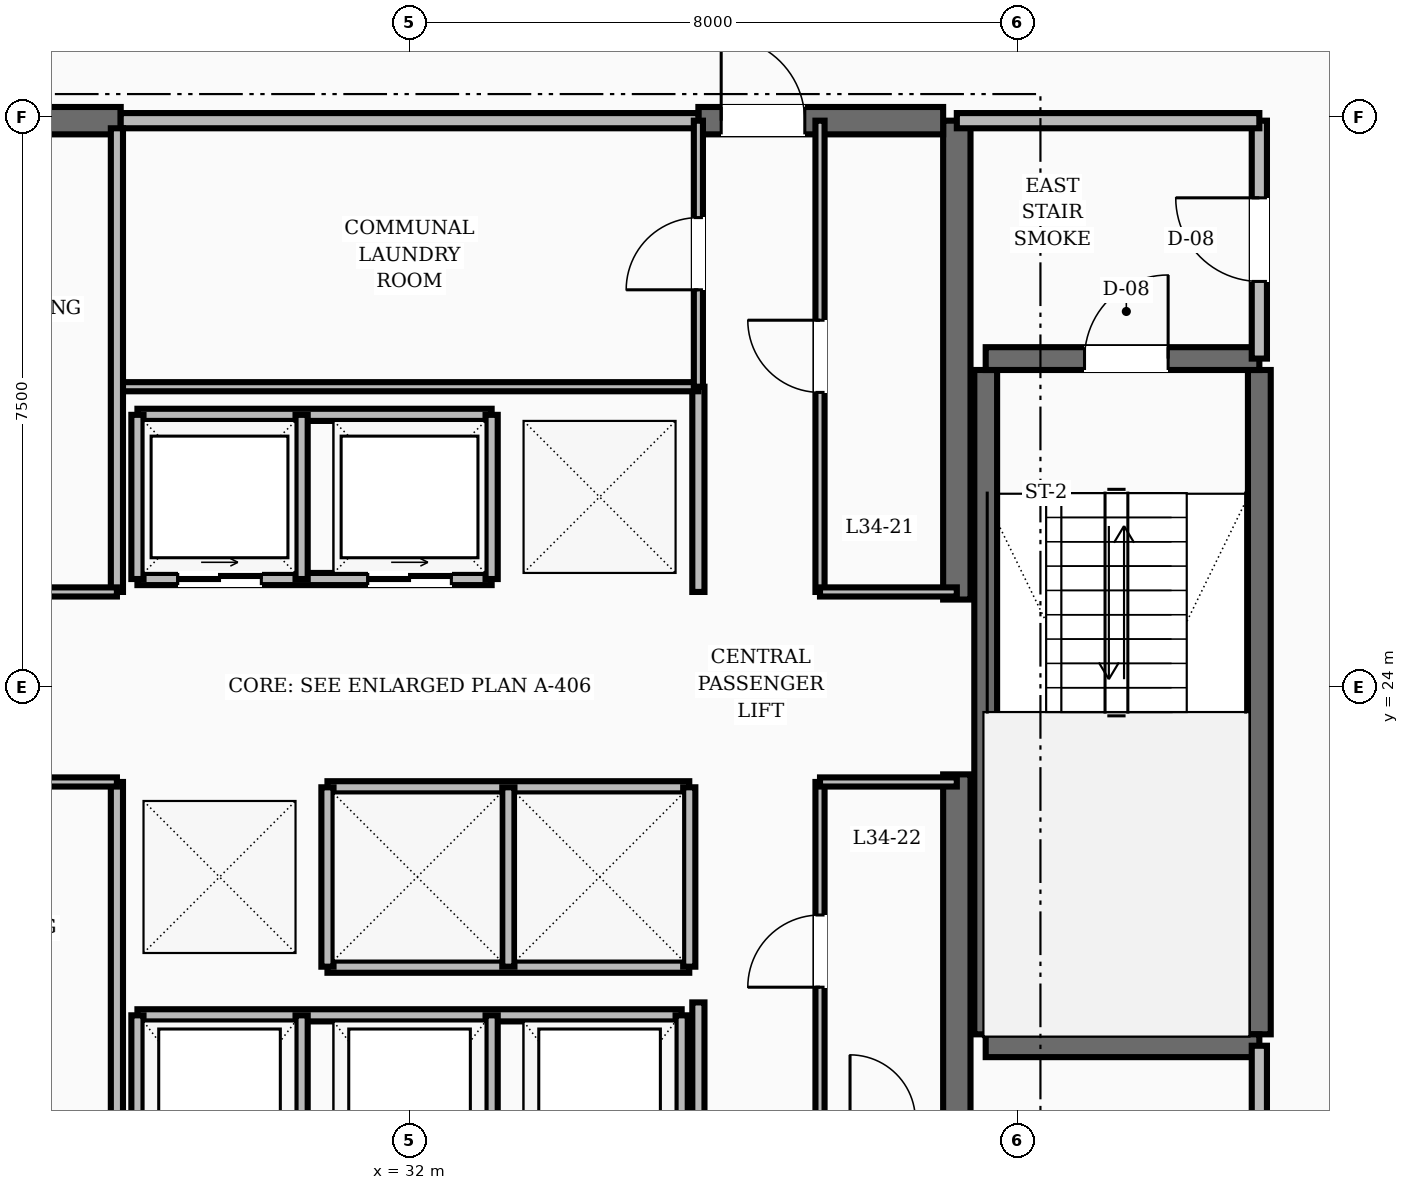
"""IFC4 building model, lengths in metres.
Left out: names, types, materials, properties, quantities, classifications, styles, units other than length and angle.
Written with IfcOpenShell. Run it as: python <this file> out.ifc"""

import sys

from ifc_helpers import new_model, si_unit, direction, frame, frame_2d, origin, place, context, subcontext, project, spatial, rectangle, extrude, element, fill, save


model = new_model("IFC4")
c1 = context("Model", 3, precision=1e-05, world=origin(), true_north=direction((0.0, 1.0)))
c2 = subcontext(c1, "Body", "Model", "MODEL_VIEW")
j1 = project(units=[si_unit("LENGTHUNIT", "METRE"), si_unit("PLANEANGLEUNIT", "RADIAN")], contexts=[c1])
p1 = place(None, origin())
s1 = spatial("IfcSite", under=j1, at=p1, CompositionType="ELEMENT")
p2 = place(p1, origin())
s2 = spatial("IfcBuilding", under=s1, at=p2, CompositionType="ELEMENT")
p3 = place(p2, frame((0.0, 0.0, 135.2)))
s3 = spatial("IfcBuildingStorey", under=s2, at=p3, CompositionType="ELEMENT", Elevation=135.2)
for number, where, z_axis, x_axis in (
    (1, (39.2, 16.55, 0.0), (0.0, 0.0, 1.0), (0.0, 1.0, 0.0)),
    (2, (39.2, 25.15, 0.0), (0.0, 0.0, 1.0), (0.0, 1.0, 0.0)),
):
    element("IfcWall", number, at=place(p3, frame(where, z_axis=z_axis, x_axis=x_axis)), inside=s3, PredefinedType="SHEAR", context=c2, shape_type="SweptSolid", body=[
        extrude(rectangle(XDim=6.3, YDim=0.36, at=frame_2d((3.15, 0.0))), origin(), (0.0, 0.0, 1.0), 3.6),
    ])
p4 = place(p3, frame((24.98, 31.45, 0.0), z_axis=(0.0, 0.0, 1.0), x_axis=(1.0, 0.0, 0.0)))
e3 = element("IfcWall", 3, at=p4, inside=s3, PredefinedType="SHEAR", context=c2, shape_type="SweptSolid", body=[
    extrude(rectangle(XDim=3.22, YDim=0.36, at=frame_2d((1.61, 0.0))), origin(), (0.0, 0.0, 1.0), 3.6),
])
p5 = place(p3, frame((35.8, 31.45, 0.0), z_axis=(0.0, 0.0, 1.0), x_axis=(1.0, 0.0, 0.0)))
e4 = element("IfcWall", 4, at=p5, inside=s3, PredefinedType="SHEAR", context=c2, shape_type="SweptSolid", body=[
    extrude(rectangle(XDim=3.22, YDim=0.36, at=frame_2d((1.61, 0.0))), origin(), (0.0, 0.0, 1.0), 3.6),
])
p6 = place(p5, frame((0.3, 0.0, 0.0)))
e5 = element("IfcOpeningElement", 5, at=p6, cuts=e4, PredefinedType="OPENING", context=c2, shape_type="SweptSolid", body=[
    extrude(rectangle(XDim=1.1, YDim=2.1, at=frame_2d((0.55, 1.05))), frame((0.0, 0.19, 0.0), z_axis=(0.0, -1.0, 0.0), x_axis=(1.0, 0.0, 0.0)), (0.0, 0.0, 1.0), 0.38),
])
for number, where, z_axis, x_axis in (
    (6, (43.18, 19.43, 0.0), (0.0, 0.0, 1.0), (0.0, 1.0, 0.0)),
    (7, (39.58, 19.43, 0.0), (0.0, 0.0, 1.0), (0.0, 1.0, 0.0)),
):
    element("IfcWall", number, at=place(p3, frame(where, z_axis=z_axis, x_axis=x_axis)), inside=s3, PredefinedType="SHEAR", context=c2, shape_type="SweptSolid", body=[
        extrude(rectangle(XDim=8.74, YDim=0.3, at=frame_2d((4.37, 0.0))), origin(), (0.0, 0.0, 1.0), 3.6),
    ])
p7 = place(p3, frame((39.58, 19.28, 0.0), z_axis=(0.0, 0.0, 1.0), x_axis=(1.0, 0.0, 0.0)))
e8 = element("IfcWall", 8, at=p7, inside=s3, PredefinedType="SHEAR", context=c2, shape_type="SweptSolid", body=[
    extrude(rectangle(XDim=3.6, YDim=0.3, at=frame_2d((1.8, 0.0))), origin(), (0.0, 0.0, 1.0), 3.6),
])
p8 = place(p3, frame((39.58, 28.32, 0.0), z_axis=(0.0, 0.0, 1.0), x_axis=(1.0, 0.0, 0.0)))
e9 = element("IfcWall", 9, at=p8, inside=s3, PredefinedType="SHEAR", context=c2, shape_type="SweptSolid", body=[
    extrude(rectangle(XDim=3.6, YDim=0.3, at=frame_2d((1.8, 0.0))), origin(), (0.0, 0.0, 1.0), 3.6),
])
p9 = place(p8, frame((1.3, 0.0, 0.0)))
e10 = element("IfcOpeningElement", 10, at=p9, cuts=e9, PredefinedType="OPENING", context=c2, shape_type="SweptSolid", body=[
    extrude(rectangle(XDim=1.1, YDim=2.1, at=frame_2d((0.55, 1.05))), frame((0.0, 0.16, 0.0), z_axis=(0.0, -1.0, 0.0), x_axis=(1.0, 0.0, 0.0)), (0.0, 0.0, 1.0), 0.32),
])
p10 = place(p3, frame((43.18, 28.32, 0.0), z_axis=(0.0, 0.0, 1.0), x_axis=(0.0, 1.0, 0.0)))
e11 = element("IfcWall", 11, at=p10, inside=s3, PredefinedType="SOLIDWALL", context=c2, shape_type="SweptSolid", body=[
    extrude(rectangle(XDim=3.13, YDim=0.2, at=frame_2d((1.565, 0.0))), origin(), (0.0, 0.0, 1.0), 2.8),
])
p11 = place(p10, frame((1.015, 0.0, 0.0)))
e12 = element("IfcOpeningElement", 12, at=p11, cuts=e11, PredefinedType="OPENING", context=c2, shape_type="SweptSolid", body=[
    extrude(rectangle(XDim=1.1, YDim=2.1, at=frame_2d((0.55, 1.05))), frame((0.0, 0.11, 0.0), z_axis=(0.0, -1.0, 0.0), x_axis=(1.0, 0.0, 0.0)), (0.0, 0.0, 1.0), 0.22),
])
p12 = place(p3, frame((39.2, 31.45, 0.0), z_axis=(0.0, 0.0, 1.0), x_axis=(1.0, 0.0, 0.0)))
e13 = element("IfcWall", 13, at=p12, inside=s3, PredefinedType="SOLIDWALL", context=c2, shape_type="SweptSolid", body=[
    extrude(rectangle(XDim=3.98, YDim=0.2, at=frame_2d((1.99, 0.0))), origin(), (0.0, 0.0, 1.0), 2.8),
])
p13 = place(p3, frame((43.18, 16.55, 0.0), z_axis=(0.0, 0.0, 1.0), x_axis=(0.0, 1.0, 0.0)))
e14 = element("IfcWall", 14, at=p13, inside=s3, PredefinedType="SOLIDWALL", context=c2, shape_type="SweptSolid", body=[
    extrude(rectangle(XDim=2.73, YDim=0.2, at=frame_2d((1.365, 0.0))), origin(), (0.0, 0.0, 1.0), 2.8),
])
p14 = place(p13, frame((0.89, 0.0, 0.0)))
e15 = element("IfcOpeningElement", 15, at=p14, cuts=e14, PredefinedType="OPENING", context=c2, shape_type="SweptSolid", body=[
    extrude(rectangle(XDim=0.95, YDim=2.1, at=frame_2d((0.475, 1.05))), frame((0.0, 0.11, 0.0), z_axis=(0.0, -1.0, 0.0), x_axis=(1.0, 0.0, 0.0)), (0.0, 0.0, 1.0), 0.22),
])
p15 = place(p3, frame((35.8, 16.55, 0.0), z_axis=(0.0, 0.0, 1.0), x_axis=(0.0, 1.0, 0.0)))
e16 = element("IfcWall", 16, at=p15, inside=s3, PredefinedType="SOLIDWALL", context=c2, shape_type="SweptSolid", body=[
    extrude(rectangle(XDim=3.3, YDim=0.16, at=frame_2d((1.65, 0.0))), origin(), (0.0, 0.0, 1.0), 2.8),
])
p16 = place(p3, frame((35.8, 25.25, 0.0), z_axis=(0.0, 0.0, 1.0), x_axis=(0.0, 1.0, 0.0)))
e17 = element("IfcWall", 17, at=p16, inside=s3, PredefinedType="SOLIDWALL", context=c2, shape_type="SweptSolid", body=[
    extrude(rectangle(XDim=2.7, YDim=0.16, at=frame_2d((1.35, 0.0))), origin(), (0.0, 0.0, 1.0), 2.8),
])
p17 = place(p3, frame((28.42, 25.42, 0.0), z_axis=(0.0, 0.0, 1.0), x_axis=(1.0, 0.0, 0.0)))
e18 = element("IfcWall", 18, at=p17, inside=s3, PredefinedType="SOLIDWALL", context=c2, shape_type="SweptSolid", body=[
    extrude(rectangle(XDim=4.66, YDim=0.16, at=frame_2d((2.33, 0.0))), origin(), (0.0, 0.0, 1.0), 2.8),
])
p18 = place(p17, frame((0.53, 0.0, 0.0)))
e19 = element("IfcOpeningElement", 19, at=p18, cuts=e18, PredefinedType="OPENING", context=c2, shape_type="SweptSolid", body=[
    extrude(rectangle(XDim=1.1, YDim=2.15, at=frame_2d((0.55, 1.075))), frame((0.0, 0.09, 0.0), z_axis=(0.0, -1.0, 0.0), x_axis=(1.0, 0.0, 0.0)), (0.0, 0.0, 1.0), 0.18),
])
p19 = place(p17, frame((3.03, 0.0, 0.0)))
e20 = element("IfcOpeningElement", 20, at=p19, cuts=e18, PredefinedType="OPENING", context=c2, shape_type="SweptSolid", body=[
    extrude(rectangle(XDim=1.1, YDim=2.15, at=frame_2d((0.55, 1.075))), frame((0.0, 0.09, 0.0), z_axis=(0.0, -1.0, 0.0), x_axis=(1.0, 0.0, 0.0)), (0.0, 0.0, 1.0), 0.18),
])
p20 = place(p3, frame((28.42, 27.58, 0.0), z_axis=(0.0, 0.0, 1.0), x_axis=(1.0, 0.0, 0.0)))
e21 = element("IfcWall", 21, at=p20, inside=s3, PredefinedType="SOLIDWALL", context=c2, shape_type="SweptSolid", body=[
    extrude(rectangle(XDim=4.66, YDim=0.16, at=frame_2d((2.33, 0.0))), origin(), (0.0, 0.0, 1.0), 2.8),
])
for number, where, z_axis, x_axis in (
    (22, (28.42, 25.42, 0.0), (0.0, 0.0, 1.0), (0.0, 1.0, 0.0)),
    (23, (30.58, 25.42, 0.0), (0.0, 0.0, 1.0), (0.0, 1.0, 0.0)),
    (24, (33.08, 25.42, 0.0), (0.0, 0.0, 1.0), (0.0, 1.0, 0.0)),
):
    element("IfcWall", number, at=place(p3, frame(where, z_axis=z_axis, x_axis=x_axis)), inside=s3, PredefinedType="SOLIDWALL", context=c2, shape_type="SweptSolid", body=[
        extrude(rectangle(XDim=2.16, YDim=0.16, at=frame_2d((1.08, 0.0))), origin(), (0.0, 0.0, 1.0), 2.8),
    ])
for number, where, z_axis, x_axis in (
    (25, (30.92, 22.68, 0.0), (0.0, 0.0, 1.0), (1.0, 0.0, 0.0)),
    (26, (30.92, 20.32, 0.0), (0.0, 0.0, 1.0), (1.0, 0.0, 0.0)),
):
    element("IfcWall", number, at=place(p3, frame(where, z_axis=z_axis, x_axis=x_axis)), inside=s3, PredefinedType="SOLIDWALL", context=c2, shape_type="SweptSolid", body=[
        extrude(rectangle(XDim=4.76, YDim=0.16, at=frame_2d((2.38, 0.0))), origin(), (0.0, 0.0, 1.0), 2.8),
    ])
for number, where, z_axis, x_axis in (
    (27, (30.92, 20.32, 0.0), (0.0, 0.0, 1.0), (0.0, 1.0, 0.0)),
    (28, (33.3, 20.32, 0.0), (0.0, 0.0, 1.0), (0.0, 1.0, 0.0)),
    (29, (35.68, 20.32, 0.0), (0.0, 0.0, 1.0), (0.0, 1.0, 0.0)),
):
    element("IfcWall", number, at=place(p3, frame(where, z_axis=z_axis, x_axis=x_axis)), inside=s3, PredefinedType="SOLIDWALL", context=c2, shape_type="SweptSolid", body=[
        extrude(rectangle(XDim=2.36, YDim=0.16, at=frame_2d((1.18, 0.0))), origin(), (0.0, 0.0, 1.0), 2.8),
    ])
p21 = place(p3, frame((28.42, 19.68, 0.0), z_axis=(0.0, 0.0, 1.0), x_axis=(1.0, 0.0, 0.0)))
e30 = element("IfcWall", 30, at=p21, inside=s3, PredefinedType="SOLIDWALL", context=c2, shape_type="SweptSolid", body=[
    extrude(rectangle(XDim=7.16, YDim=0.16, at=frame_2d((3.58, 0.0))), origin(), (0.0, 0.0, 1.0), 2.8),
])
for number, where, z_axis, x_axis in (
    (31, (28.42, 16.92, 0.0), (0.0, 0.0, 1.0), (0.0, 1.0, 0.0)),
    (32, (30.58, 16.92, 0.0), (0.0, 0.0, 1.0), (0.0, 1.0, 0.0)),
    (33, (33.08, 16.92, 0.0), (0.0, 0.0, 1.0), (0.0, 1.0, 0.0)),
    (34, (35.58, 16.92, 0.0), (0.0, 0.0, 1.0), (0.0, 1.0, 0.0)),
):
    element("IfcWall", number, at=place(p3, frame(where, z_axis=z_axis, x_axis=x_axis)), inside=s3, PredefinedType="SOLIDWALL", context=c2, shape_type="SweptSolid", body=[
        extrude(rectangle(XDim=2.76, YDim=0.16, at=frame_2d((1.38, 0.0))), origin(), (0.0, 0.0, 1.0), 2.8),
    ])
p22 = place(p3, frame((28.2, 31.45, 0.0), z_axis=(0.0, 0.0, 1.0), x_axis=(1.0, 0.0, 0.0)))
e35 = element("IfcWall", 35, at=p22, inside=s3, PredefinedType="SOLIDWALL", context=c2, shape_type="SweptSolid", body=[
    extrude(rectangle(XDim=7.6, YDim=0.2, at=frame_2d((3.8, 0.0))), origin(), (0.0, 0.0, 1.0), 2.8),
])
p23 = place(p3, frame((28.2, 27.95, 0.0), z_axis=(0.0, 0.0, 1.0), x_axis=(1.0, 0.0, 0.0)))
e36 = element("IfcWall", 36, at=p23, inside=s3, PredefinedType="PARTITIONING", context=c2, shape_type="SweptSolid", body=[
    extrude(rectangle(XDim=7.6, YDim=0.12, at=frame_2d((3.8, 0.0))), origin(), (0.0, 0.0, 1.0), 2.8),
])
p24 = place(p3, frame((35.8, 27.95, 0.0), z_axis=(0.0, 0.0, 1.0), x_axis=(0.0, 1.0, 0.0)))
e37 = element("IfcWall", 37, at=p24, inside=s3, PredefinedType="PARTITIONING", context=c2, shape_type="SweptSolid", body=[
    extrude(rectangle(XDim=3.5, YDim=0.12, at=frame_2d((1.75, 0.0))), origin(), (0.0, 0.0, 1.0), 2.8),
])
p25 = place(p24, frame((1.275, 0.0, 0.0)))
e38 = element("IfcOpeningElement", 38, at=p25, cuts=e37, PredefinedType="OPENING", context=c2, shape_type="SweptSolid", body=[
    extrude(rectangle(XDim=0.95, YDim=2.1, at=frame_2d((0.475, 1.05))), frame((0.0, 0.07, 0.0), z_axis=(0.0, -1.0, 0.0), x_axis=(1.0, 0.0, 0.0)), (0.0, 0.0, 1.0), 0.14),
])
p26 = place(p3, frame((28.15, 16.7, 0.0), z_axis=(0.0, 0.0, 1.0), x_axis=(0.0, 1.0, 0.0)))
e39 = element("IfcWall", 39, at=p26, inside=s3, PredefinedType="SOLIDWALL", context=c2, shape_type="SweptSolid", body=[
    extrude(rectangle(XDim=6.05, YDim=0.16, at=frame_2d((3.025, 0.0))), origin(), (0.0, 0.0, 1.0), 2.8),
])
p27 = place(p3, frame((28.15, 25.25, 0.0), z_axis=(0.0, 0.0, 1.0), x_axis=(0.0, 1.0, 0.0)))
e40 = element("IfcWall", 40, at=p27, inside=s3, PredefinedType="SOLIDWALL", context=c2, shape_type="SweptSolid", body=[
    extrude(rectangle(XDim=6.1, YDim=0.16, at=frame_2d((3.05, 0.0))), origin(), (0.0, 0.0, 1.0), 2.8),
])
p28 = place(p3, frame((24.95, 25.25, 0.0), z_axis=(0.0, 0.0, 1.0), x_axis=(1.0, 0.0, 0.0)))
e41 = element("IfcWall", 41, at=p28, inside=s3, PredefinedType="PARTITIONING", context=c2, shape_type="SweptSolid", body=[
    extrude(rectangle(XDim=3.2, YDim=0.12, at=frame_2d((1.6, 0.0))), origin(), (0.0, 0.0, 1.0), 2.8),
])
p29 = place(p28, frame((1.125, 0.0, 0.0)))
e42 = element("IfcOpeningElement", 42, at=p29, cuts=e41, PredefinedType="OPENING", context=c2, shape_type="SweptSolid", body=[
    extrude(rectangle(XDim=0.95, YDim=2.1, at=frame_2d((0.475, 1.05))), frame((0.0, 0.07, 0.0), z_axis=(0.0, -1.0, 0.0), x_axis=(1.0, 0.0, 0.0)), (0.0, 0.0, 1.0), 0.14),
])
p30 = place(p3, frame((24.95, 22.75, 0.0), z_axis=(0.0, 0.0, 1.0), x_axis=(1.0, 0.0, 0.0)))
e43 = element("IfcWall", 43, at=p30, inside=s3, PredefinedType="PARTITIONING", context=c2, shape_type="SweptSolid", body=[
    extrude(rectangle(XDim=3.2, YDim=0.12, at=frame_2d((1.6, 0.0))), origin(), (0.0, 0.0, 1.0), 2.8),
])
p31 = place(p30, frame((1.125, 0.0, 0.0)))
e44 = element("IfcOpeningElement", 44, at=p31, cuts=e43, PredefinedType="OPENING", context=c2, shape_type="SweptSolid", body=[
    extrude(rectangle(XDim=0.95, YDim=2.1, at=frame_2d((0.475, 1.05))), frame((0.0, 0.07, 0.0), z_axis=(0.0, -1.0, 0.0), x_axis=(1.0, 0.0, 0.0)), (0.0, 0.0, 1.0), 0.14),
])
p32 = place(p3, frame((37.4, 25.25, 0.0), z_axis=(0.0, 0.0, 1.0), x_axis=(0.0, 1.0, 0.0)))
e45 = element("IfcWall", 45, at=p32, inside=s3, PredefinedType="PARTITIONING", context=c2, shape_type="SweptSolid", body=[
    extrude(rectangle(XDim=6.2, YDim=0.12, at=frame_2d((3.1, 0.0))), origin(), (0.0, 0.0, 1.0), 2.8),
])
p33 = place(p32, frame((2.625, 0.0, 0.0)))
e46 = element("IfcOpeningElement", 46, at=p33, cuts=e45, PredefinedType="OPENING", context=c2, shape_type="SweptSolid", body=[
    extrude(rectangle(XDim=0.95, YDim=2.1, at=frame_2d((0.475, 1.05))), frame((0.0, 0.07, 0.0), z_axis=(0.0, -1.0, 0.0), x_axis=(1.0, 0.0, 0.0)), (0.0, 0.0, 1.0), 0.14),
])
p34 = place(p3, frame((37.4, 25.25, 0.0), z_axis=(0.0, 0.0, 1.0), x_axis=(1.0, 0.0, 0.0)))
e47 = element("IfcWall", 47, at=p34, inside=s3, PredefinedType="PARTITIONING", context=c2, shape_type="SweptSolid", body=[
    extrude(rectangle(XDim=1.8, YDim=0.12, at=frame_2d((0.9, 0.0))), origin(), (0.0, 0.0, 1.0), 2.8),
])
p35 = place(p3, frame((37.4, 18.3, 0.0), z_axis=(0.0, 0.0, 1.0), x_axis=(0.0, 1.0, 0.0)))
e48 = element("IfcWall", 48, at=p35, inside=s3, PredefinedType="PARTITIONING", context=c2, shape_type="SweptSolid", body=[
    extrude(rectangle(XDim=4.45, YDim=0.12, at=frame_2d((2.225, 0.0))), origin(), (0.0, 0.0, 1.0), 2.8),
])
p36 = place(p35, frame((1.75, 0.0, 0.0)))
e49 = element("IfcOpeningElement", 49, at=p36, cuts=e48, PredefinedType="OPENING", context=c2, shape_type="SweptSolid", body=[
    extrude(rectangle(XDim=0.95, YDim=2.1, at=frame_2d((0.475, 1.05))), frame((0.0, 0.07, 0.0), z_axis=(0.0, -1.0, 0.0), x_axis=(1.0, 0.0, 0.0)), (0.0, 0.0, 1.0), 0.14),
])
p37 = place(p3, frame((37.4, 22.75, 0.0), z_axis=(0.0, 0.0, 1.0), x_axis=(1.0, 0.0, 0.0)))
e50 = element("IfcWall", 50, at=p37, inside=s3, PredefinedType="PARTITIONING", context=c2, shape_type="SweptSolid", body=[
    extrude(rectangle(XDim=1.8, YDim=0.12, at=frame_2d((0.9, 0.0))), origin(), (0.0, 0.0, 1.0), 2.8),
])
p38 = place(p9, origin())
e51 = element("IfcDoor", 51, at=p38, inside=s3, OperationType="SINGLE_SWING_RIGHT", PredefinedType="DOOR", context=c2, shape_type="SweptSolid", body=[
    extrude(rectangle(XDim=1.1, YDim=2.1, at=frame_2d((0.55, 1.05))), frame((0.0, 0.025, 0.0), z_axis=(0.0, -1.0, 0.0), x_axis=(1.0, 0.0, 0.0)), (0.0, 0.0, 1.0), 0.05),
])
fill(e10, e51)
p39 = place(p11, origin())
e52 = element("IfcDoor", 52, at=p39, inside=s3, OperationType="SINGLE_SWING_RIGHT", PredefinedType="DOOR", context=c2, shape_type="SweptSolid", body=[
    extrude(rectangle(XDim=1.1, YDim=2.1, at=frame_2d((0.55, 1.05))), frame((0.0, 0.025, 0.0), z_axis=(0.0, -1.0, 0.0), x_axis=(1.0, 0.0, 0.0)), (0.0, 0.0, 1.0), 0.05),
])
fill(e12, e52)
p40 = place(p6, origin())
e53 = element("IfcDoor", 53, at=p40, inside=s3, OperationType="SINGLE_SWING_LEFT", PredefinedType="DOOR", context=c2, shape_type="SweptSolid", body=[
    extrude(rectangle(XDim=1.1, YDim=2.1, at=frame_2d((0.55, 1.05))), frame((0.0, 0.025, 0.0), z_axis=(0.0, -1.0, 0.0), x_axis=(1.0, 0.0, 0.0)), (0.0, 0.0, 1.0), 0.05),
])
fill(e5, e53)
p41 = place(p18, origin())
e54 = element("IfcDoor", 54, at=p41, inside=s3, OperationType="SLIDING_TO_RIGHT", PredefinedType="DOOR", context=c2, shape_type="SweptSolid", body=[
    extrude(rectangle(XDim=1.1, YDim=2.15, at=frame_2d((0.55, 1.075))), frame((0.0, 0.025, 0.0), z_axis=(0.0, -1.0, 0.0), x_axis=(1.0, 0.0, 0.0)), (0.0, 0.0, 1.0), 0.05),
])
fill(e19, e54)
p42 = place(p19, origin())
e55 = element("IfcDoor", 55, at=p42, inside=s3, OperationType="SLIDING_TO_RIGHT", PredefinedType="DOOR", context=c2, shape_type="SweptSolid", body=[
    extrude(rectangle(XDim=1.1, YDim=2.15, at=frame_2d((0.55, 1.075))), frame((0.0, 0.025, 0.0), z_axis=(0.0, -1.0, 0.0), x_axis=(1.0, 0.0, 0.0)), (0.0, 0.0, 1.0), 0.05),
])
fill(e20, e55)
p43 = place(p25, origin())
e56 = element("IfcDoor", 56, at=p43, inside=s3, OperationType="SINGLE_SWING_LEFT", PredefinedType="DOOR", context=c2, shape_type="SweptSolid", body=[
    extrude(rectangle(XDim=0.95, YDim=2.1, at=frame_2d((0.475, 1.05))), frame((0.0, 0.025, 0.0), z_axis=(0.0, -1.0, 0.0), x_axis=(1.0, 0.0, 0.0)), (0.0, 0.0, 1.0), 0.05),
])
fill(e38, e56)
p44 = place(p33, origin())
e57 = element("IfcDoor", 57, at=p44, inside=s3, OperationType="SINGLE_SWING_RIGHT", PredefinedType="DOOR", context=c2, shape_type="SweptSolid", body=[
    extrude(rectangle(XDim=0.95, YDim=2.1, at=frame_2d((0.475, 1.05))), frame((0.0, 0.025, 0.0), z_axis=(0.0, -1.0, 0.0), x_axis=(1.0, 0.0, 0.0)), (0.0, 0.0, 1.0), 0.05),
])
fill(e46, e57)
p45 = place(p36, origin())
e58 = element("IfcDoor", 58, at=p45, inside=s3, OperationType="SINGLE_SWING_LEFT", PredefinedType="DOOR", context=c2, shape_type="SweptSolid", body=[
    extrude(rectangle(XDim=0.95, YDim=2.1, at=frame_2d((0.475, 1.05))), frame((0.0, 0.025, 0.0), z_axis=(0.0, -1.0, 0.0), x_axis=(1.0, 0.0, 0.0)), (0.0, 0.0, 1.0), 0.05),
])
fill(e49, e58)
save(model, sys.argv[1])
